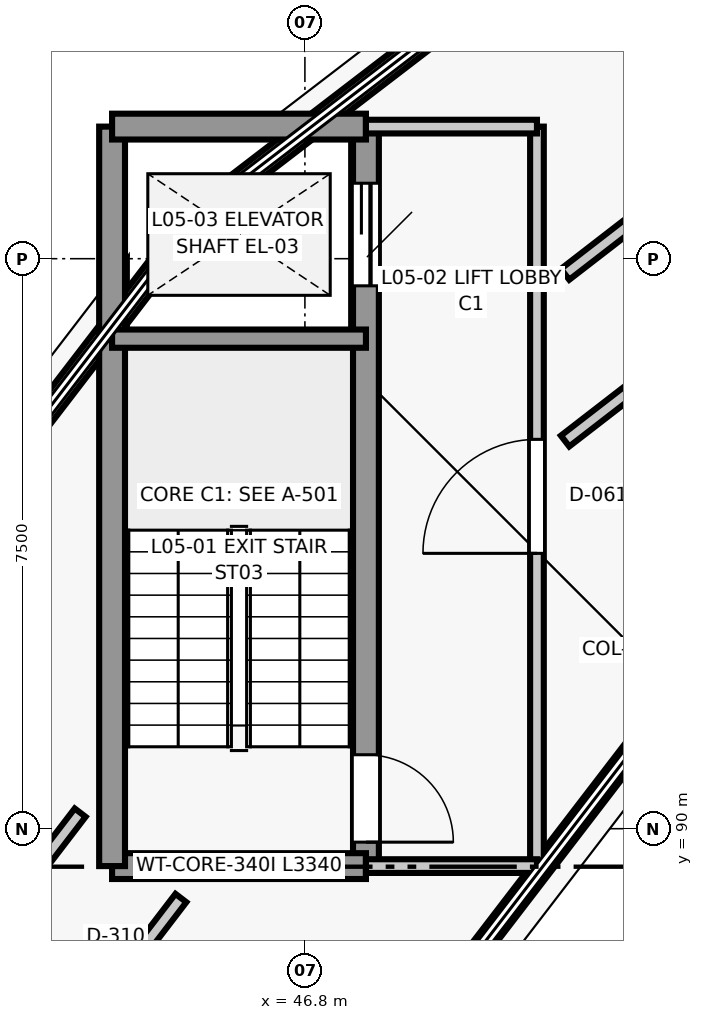
"""IFC4 building model, lengths in metres.
Left out: names, types, materials, properties, quantities, classifications, styles, units other than length and angle.
Written with IfcOpenShell. Run it as: python <this file> out.ifc"""

import sys

from ifc_helpers import new_model, si_unit, direction, frame, frame_2d, origin, place, context, subcontext, project, spatial, rectangle, extrude, element, fill, save


model = new_model("IFC4")
c1 = context("Model", 3, precision=1e-05, world=origin(), true_north=direction((0.0, 1.0)))
c2 = subcontext(c1, "Body", "Model", "MODEL_VIEW")
j1 = project(units=[si_unit("LENGTHUNIT", "METRE"), si_unit("PLANEANGLEUNIT", "RADIAN")], contexts=[c1])
p1 = place(None, origin())
s1 = spatial("IfcSite", under=j1, at=p1, CompositionType="ELEMENT")
p2 = place(p1, origin())
s2 = spatial("IfcBuilding", under=s1, at=p2, CompositionType="ELEMENT")
p3 = place(p2, frame((0.0, 0.0, 20.4)))
s3 = spatial("IfcBuildingStorey", under=s2, at=p3, CompositionType="ELEMENT", Elevation=20.4)
p4 = place(p3, frame((45.402, 98.098, 0.0), z_axis=(0.0, 0.0, 1.0), x_axis=(0.793347191248, 0.608769442514, 0.0)))
e1 = element("IfcWall", 1, at=p4, inside=s3, PredefinedType="STANDARD", context=c2, shape_type="SweptSolid", body=[
    extrude(rectangle(XDim=11.587, YDim=0.28, at=frame_2d((5.793, 0.0))), origin(), (0.0, 0.0, 1.0), 0.82),
])
p5 = place(p3, frame((38.436, 89.019, 0.0), z_axis=(0.0, 0.0, 1.0), x_axis=(0.608753523874, 0.793359406052, 0.0)))
e2 = element("IfcWall", 2, at=p5, inside=s3, PredefinedType="STANDARD", context=c2, shape_type="SweptSolid", body=[
    extrude(rectangle(XDim=11.444, YDim=0.28, at=frame_2d((5.722, 0.0))), origin(), (0.0, 0.0, 1.0), 0.82),
])
p6 = place(p3, frame((51.481, 91.524, 0.0), z_axis=(0.0, 0.0, 1.0), x_axis=(-0.608769580289, -0.793347085527, 0.0)))
e3 = element("IfcWall", 3, at=p6, inside=s3, PredefinedType="STANDARD", context=c2, shape_type="SweptSolid", body=[
    extrude(rectangle(XDim=9.005, YDim=0.25, at=frame_2d((4.502, 0.0))), origin(), (0.0, 0.0, 1.0), 0.82),
])
p7 = place(p3, frame((47.603, 99.238, 0.0), z_axis=(0.0, 0.0, 1.0), x_axis=(0.0, -1.0, 0.0)))
e4 = element("IfcWall", 4, at=p7, inside=s3, PredefinedType="SHEAR", context=c2, shape_type="SweptSolid", body=[
    extrude(rectangle(XDim=9.73, YDim=0.34, at=frame_2d((4.865, 0.0))), origin(), (0.0, 0.0, 1.0), 3.9),
])
p8 = place(p7, frame((8.265, 0.0, 0.0)))
e5 = element("IfcOpeningElement", 5, at=p8, cuts=e4, PredefinedType="OPENING", context=c2, shape_type="SweptSolid", body=[
    extrude(rectangle(XDim=1.15, YDim=2.15, at=frame_2d((0.575, 1.075))), frame((0.0, 0.18, 0.0), z_axis=(0.0, -1.0, 0.0), x_axis=(1.0, 0.0, 0.0)), (0.0, 0.0, 1.0), 0.36),
])
p9 = place(p7, frame((0.745, 0.0, 0.0)))
e6 = element("IfcOpeningElement", 6, at=p9, cuts=e4, PredefinedType="OPENING", context=c2, shape_type="SweptSolid", body=[
    extrude(rectangle(XDim=1.35, YDim=2.15, at=frame_2d((0.675, 1.075))), frame((0.0, 0.18, 0.0), z_axis=(0.0, -1.0, 0.0), x_axis=(1.0, 0.0, 0.0)), (0.0, 0.0, 1.0), 0.36),
])
p10 = place(p3, frame((47.603, 89.508, 0.0), z_axis=(0.0, 0.0, 1.0), x_axis=(-1.0, 0.0, 0.0)))
e7 = element("IfcWall", 7, at=p10, inside=s3, PredefinedType="SHEAR", context=c2, shape_type="SweptSolid", body=[
    extrude(rectangle(XDim=3.34, YDim=0.34, at=frame_2d((1.67, 0.0))), origin(), (0.0, 0.0, 1.0), 3.9),
])
p11 = place(p3, frame((44.263, 89.508, 0.0), z_axis=(0.0, 0.0, 1.0), x_axis=(0.0, 1.0, 0.0)))
e8 = element("IfcWall", 8, at=p11, inside=s3, PredefinedType="SHEAR", context=c2, shape_type="SweptSolid", body=[
    extrude(rectangle(XDim=9.73, YDim=0.34, at=frame_2d((4.865, 0.0))), origin(), (0.0, 0.0, 1.0), 3.9),
])
p12 = place(p3, frame((44.263, 99.238, 0.0), z_axis=(0.0, 0.0, 1.0), x_axis=(1.0, 0.0, 0.0)))
e9 = element("IfcWall", 9, at=p12, inside=s3, PredefinedType="SHEAR", context=c2, shape_type="SweptSolid", body=[
    extrude(rectangle(XDim=3.34, YDim=0.34, at=frame_2d((1.67, 0.0))), origin(), (0.0, 0.0, 1.0), 3.9),
])
p13 = place(p3, frame((47.603, 96.448, 0.0), z_axis=(0.0, 0.0, 1.0), x_axis=(-1.0, 0.0, 0.0)))
e10 = element("IfcWall", 10, at=p13, inside=s3, PredefinedType="SHEAR", context=c2, shape_type="SweptSolid", body=[
    extrude(rectangle(XDim=3.34, YDim=0.24, at=frame_2d((1.67, 0.0))), origin(), (0.0, 0.0, 1.0), 3.9),
])
p14 = place(p3, frame((49.853, 89.508, 0.0), z_axis=(0.0, 0.0, 1.0), x_axis=(0.0, 1.0, 0.0)))
e11 = element("IfcWall", 11, at=p14, inside=s3, PredefinedType="PARTITIONING", context=c2, shape_type="SweptSolid", body=[
    extrude(rectangle(XDim=9.73, YDim=0.18, at=frame_2d((4.865, 0.0))), origin(), (0.0, 0.0, 1.0), 3.675),
])
p15 = place(p14, frame((4.115, 0.0, 0.0)))
e12 = element("IfcOpeningElement", 12, at=p15, cuts=e11, PredefinedType="OPENING", context=c2, shape_type="SweptSolid", body=[
    extrude(rectangle(XDim=1.5, YDim=2.15, at=frame_2d((0.75, 1.075))), frame((0.0, 0.1, 0.0), z_axis=(0.0, -1.0, 0.0), x_axis=(1.0, 0.0, 0.0)), (0.0, 0.0, 1.0), 0.2),
])
for number, where, z_axis, x_axis in (
    (13, (47.603, 89.508, 0.0), (0.0, 0.0, 1.0), (1.0, 0.0, 0.0)),
    (14, (47.603, 99.238, 0.0), (0.0, 0.0, 1.0), (1.0, 0.0, 0.0)),
):
    element("IfcWall", number, at=place(p3, frame(where, z_axis=z_axis, x_axis=x_axis)), inside=s3, PredefinedType="PARTITIONING", context=c2, shape_type="SweptSolid", body=[
        extrude(rectangle(XDim=2.25, YDim=0.18, at=frame_2d((1.125, 0.0))), origin(), (0.0, 0.0, 1.0), 3.675),
    ])
p16 = place(p3, frame((56.567, 102.2, 0.0), z_axis=(0.0, 0.0, 1.0), x_axis=(-0.791072038265, -0.611723001264, 0.0)))
e15 = element("IfcWall", 15, at=p16, inside=s3, PredefinedType="PARTITIONING", context=c2, shape_type="SweptSolid", body=[
    extrude(rectangle(XDim=8.019, YDim=0.18, at=frame_2d((4.01, 0.0))), origin(), (0.0, 0.0, 1.0), 3.675),
])
p17 = place(p16, frame((3.535, 0.0, 0.0)))
e16 = element("IfcOpeningElement", 16, at=p17, cuts=e15, PredefinedType="OPENING", context=c2, shape_type="SweptSolid", body=[
    extrude(rectangle(XDim=0.95, YDim=2.1, at=frame_2d((0.475, 1.05))), frame((0.0, 0.1, 0.0), z_axis=(0.0, -1.0, 0.0), x_axis=(1.0, 0.0, 0.0)), (0.0, 0.0, 1.0), 0.2),
])
p18 = place(p3, frame((57.449, 100.688, 0.0), z_axis=(0.0, 0.0, 1.0), x_axis=(-0.791077471119, -0.611715975505, 0.0)))
e17 = element("IfcWall", 17, at=p18, inside=s3, PredefinedType="PARTITIONING", context=c2, shape_type="SweptSolid", body=[
    extrude(rectangle(XDim=9.135, YDim=0.18, at=frame_2d((4.567, 0.0))), origin(), (0.0, 0.0, 1.0), 3.675),
])
p19 = place(p18, frame((4.042, 0.0, 0.0)))
e18 = element("IfcOpeningElement", 18, at=p19, cuts=e17, PredefinedType="OPENING", context=c2, shape_type="SweptSolid", body=[
    extrude(rectangle(XDim=1.05, YDim=2.1, at=frame_2d((0.525, 1.05))), frame((0.0, 0.1, 0.0), z_axis=(0.0, -1.0, 0.0), x_axis=(1.0, 0.0, 0.0)), (0.0, 0.0, 1.0), 0.2),
])
p20 = place(p3, frame((43.843, 90.211, 0.0), z_axis=(0.0, 0.0, 1.0), x_axis=(-0.607795177302, -0.794093837307, 0.0)))
e19 = element("IfcWall", 19, at=p20, inside=s3, PredefinedType="PARTITIONING", context=c2, shape_type="SweptSolid", body=[
    extrude(rectangle(XDim=4.359, YDim=0.18, at=frame_2d((2.179, 0.0))), origin(), (0.0, 0.0, 1.0), 3.675),
])
p21 = place(p20, frame((1.579, 0.0, 0.0)))
e20 = element("IfcOpeningElement", 20, at=p21, cuts=e19, PredefinedType="OPENING", context=c2, shape_type="SweptSolid", body=[
    extrude(rectangle(XDim=1.2, YDim=2.15, at=frame_2d((0.6, 1.075))), frame((0.0, 0.1, 0.0), z_axis=(0.0, -1.0, 0.0), x_axis=(1.0, 0.0, 0.0)), (0.0, 0.0, 1.0), 0.2),
])
p22 = place(p3, frame((45.168, 89.088, 0.0), z_axis=(0.0, 0.0, 1.0), x_axis=(-0.607772588398, -0.794111126223, 0.0)))
e21 = element("IfcWall", 21, at=p22, inside=s3, PredefinedType="PARTITIONING", context=c2, shape_type="SweptSolid", body=[
    extrude(rectangle(XDim=4.046, YDim=0.18, at=frame_2d((2.023, 0.0))), origin(), (0.0, 0.0, 1.0), 3.675),
])
p23 = place(p22, frame((1.273, 0.0, 0.0)))
e22 = element("IfcOpeningElement", 22, at=p23, cuts=e21, PredefinedType="OPENING", context=c2, shape_type="SweptSolid", body=[
    extrude(rectangle(XDim=1.5, YDim=2.15, at=frame_2d((0.75, 1.075))), frame((0.0, 0.1, 0.0), z_axis=(0.0, -1.0, 0.0), x_axis=(1.0, 0.0, 0.0)), (0.0, 0.0, 1.0), 0.2),
])
p24 = place(p8, origin())
e23 = element("IfcDoor", 23, at=p24, inside=s3, OperationType="SINGLE_SWING_RIGHT", PredefinedType="DOOR", context=c2, shape_type="SweptSolid", body=[
    extrude(rectangle(XDim=1.15, YDim=2.15, at=frame_2d((0.575, 1.075))), frame((0.0, 0.025, 0.0), z_axis=(0.0, -1.0, 0.0), x_axis=(1.0, 0.0, 0.0)), (0.0, 0.0, 1.0), 0.05),
])
fill(e5, e23)
p25 = place(p9, origin())
e24 = element("IfcDoor", 24, at=p25, inside=s3, OperationType="SLIDING_TO_LEFT", PredefinedType="DOOR", context=c2, shape_type="SweptSolid", body=[
    extrude(rectangle(XDim=1.35, YDim=2.15, at=frame_2d((0.675, 1.075))), frame((0.0, 0.025, 0.0), z_axis=(0.0, -1.0, 0.0), x_axis=(1.0, 0.0, 0.0)), (0.0, 0.0, 1.0), 0.05),
])
fill(e6, e24)
p26 = place(p15, origin())
e25 = element("IfcDoor", 25, at=p26, inside=s3, OperationType="SINGLE_SWING_LEFT", PredefinedType="DOOR", context=c2, shape_type="SweptSolid", body=[
    extrude(rectangle(XDim=1.5, YDim=2.15, at=frame_2d((0.75, 1.075))), frame((0.0, 0.025, 0.0), z_axis=(0.0, -1.0, 0.0), x_axis=(1.0, 0.0, 0.0)), (0.0, 0.0, 1.0), 0.05),
])
fill(e12, e25)
save(model, sys.argv[1])
